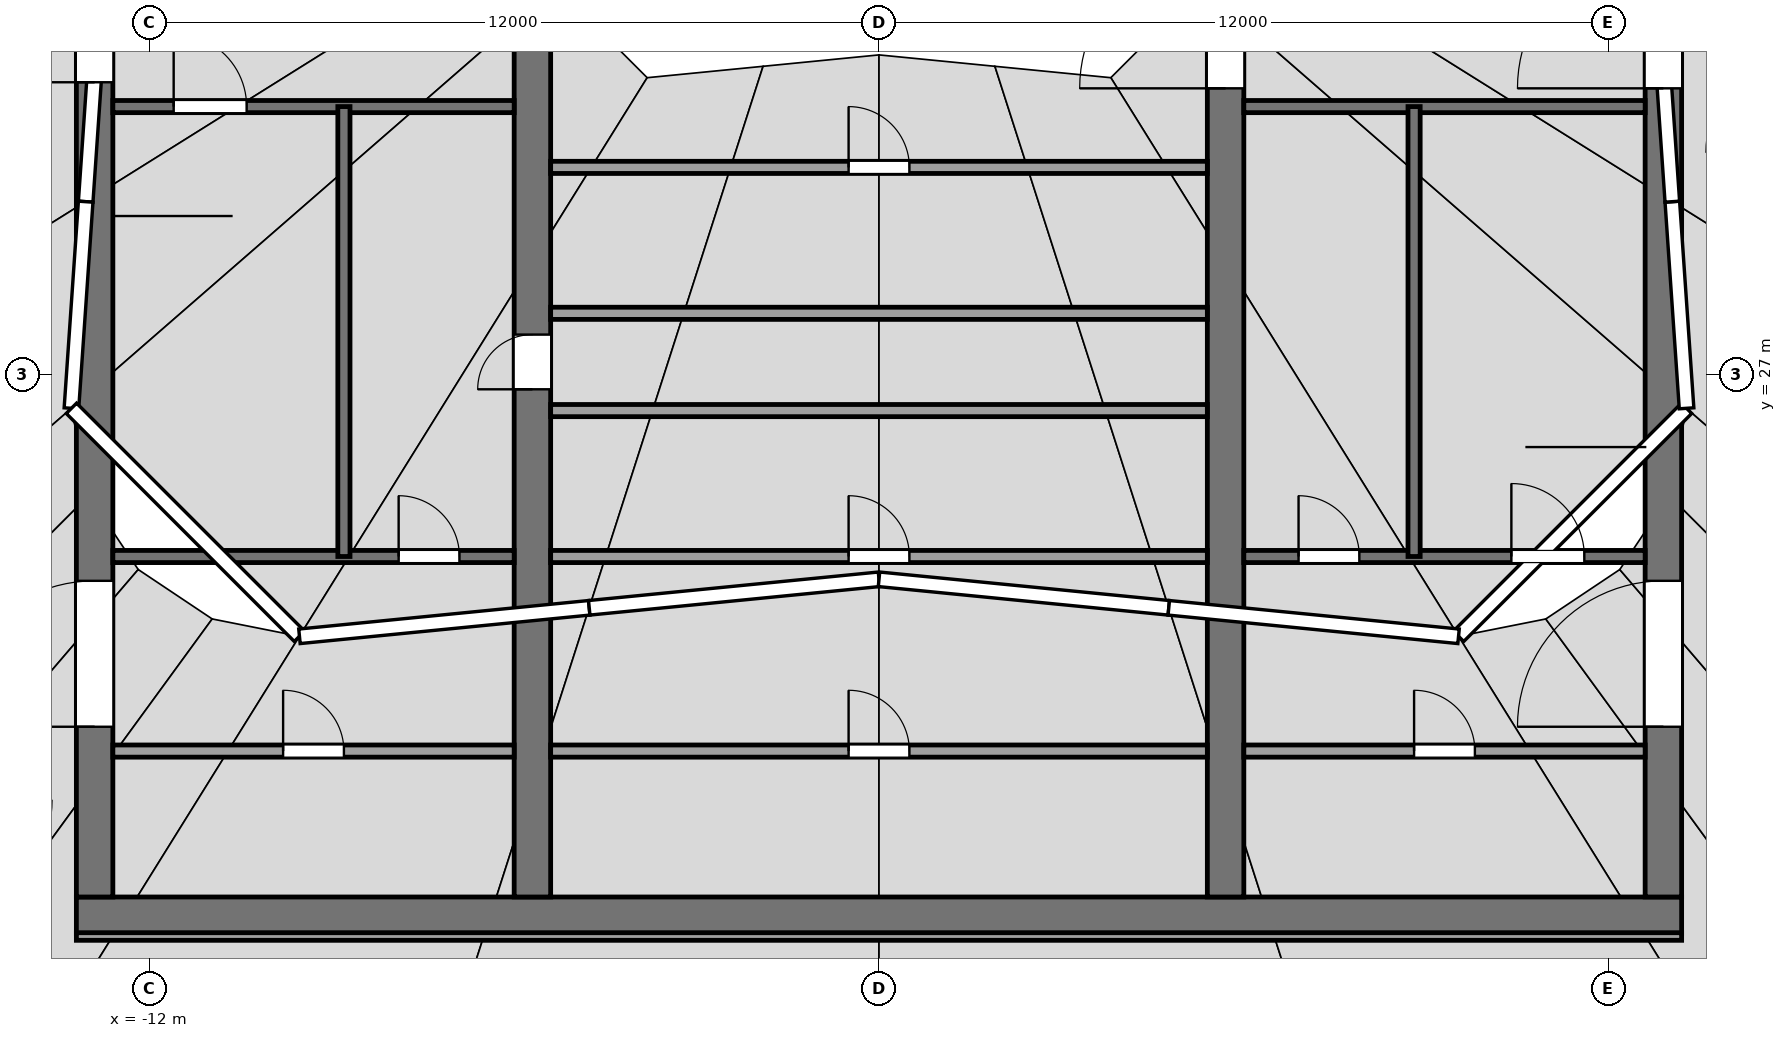
"""IFC4 building model, lengths in metres.
Left out: names, types, materials, properties, quantities, classifications, styles, units other than length and angle.
Written with IfcOpenShell. Run it as: python <this file> out.ifc"""

import sys

from ifc_helpers import new_model, si_unit, direction, frame, frame_2d, origin, place, context, subcontext, project, spatial, rectangle, extrude, element, fill, save


model = new_model("IFC4")
c1 = context("Model", 3, precision=1e-05, world=origin(), true_north=direction((0.0, 1.0)))
c2 = subcontext(c1, "Body", "Model", "MODEL_VIEW")
j1 = project(units=[si_unit("LENGTHUNIT", "METRE"), si_unit("PLANEANGLEUNIT", "RADIAN")], contexts=[c1])
p1 = place(None, origin())
s1 = spatial("IfcSite", under=j1, at=p1, CompositionType="ELEMENT")
p2 = place(p1, origin())
s2 = spatial("IfcBuilding", under=s1, at=p2, CompositionType="ELEMENT")
p3 = place(p2, frame((0.0, 0.0, 368.0)))
s3 = spatial("IfcBuildingStorey", under=s2, at=p3, CompositionType="ELEMENT", Elevation=368.0)
p4 = place(p3, frame((-13.2, 18.1, -0.15), z_axis=(0.0, 0.0, 1.0), x_axis=(1.0, 0.0, 0.0)))
e1 = element("IfcWall", 1, at=p4, inside=s3, PredefinedType="SHEAR", context=c2, shape_type="SweptSolid", body=[
    extrude(rectangle(XDim=26.4, YDim=0.6, at=frame_2d((13.2, 0.0))), origin(), (0.0, 0.0, 1.0), 3.45),
])
p5 = place(p3, frame((-12.9, 18.4, -0.15), z_axis=(0.0, 0.0, 1.0), x_axis=(0.0, 1.0, 0.0)))
e2 = element("IfcWall", 2, at=p5, inside=s3, PredefinedType="SHEAR", context=c2, shape_type="SweptSolid", body=[
    extrude(rectangle(XDim=19.2, YDim=0.6, at=frame_2d((9.6, 0.0))), origin(), (0.0, 0.0, 1.0), 3.45),
])
p6 = place(p5, frame((2.8, 0.0, 0.15)))
e3 = element("IfcOpeningElement", 3, at=p6, cuts=e2, PredefinedType="OPENING", context=c2, shape_type="SweptSolid", body=[
    extrude(rectangle(XDim=2.4, YDim=2.4, at=frame_2d((1.2, 1.2))), frame((0.0, 0.31, 0.0), z_axis=(0.0, -1.0, 0.0), x_axis=(1.0, 0.0, 0.0)), (0.0, 0.0, 1.0), 0.62),
])
p7 = place(p5, frame((13.4, 0.0, 0.15)))
e4 = element("IfcOpeningElement", 4, at=p7, cuts=e2, PredefinedType="OPENING", context=c2, shape_type="SweptSolid", body=[
    extrude(rectangle(XDim=1.4, YDim=2.2, at=frame_2d((0.7, 1.1))), frame((0.0, 0.31, 0.0), z_axis=(0.0, -1.0, 0.0), x_axis=(1.0, 0.0, 0.0)), (0.0, 0.0, 1.0), 0.62),
])
p8 = place(p3, frame((12.9, 18.4, -0.15), z_axis=(0.0, 0.0, 1.0), x_axis=(0.0, 1.0, 0.0)))
e5 = element("IfcWall", 5, at=p8, inside=s3, PredefinedType="SHEAR", context=c2, shape_type="SweptSolid", body=[
    extrude(rectangle(XDim=19.2, YDim=0.6, at=frame_2d((9.6, 0.0))), origin(), (0.0, 0.0, 1.0), 3.45),
])
p9 = place(p8, frame((2.8, 0.0, 0.15)))
e6 = element("IfcOpeningElement", 6, at=p9, cuts=e5, PredefinedType="OPENING", context=c2, shape_type="SweptSolid", body=[
    extrude(rectangle(XDim=2.4, YDim=2.4, at=frame_2d((1.2, 1.2))), frame((0.0, 0.31, 0.0), z_axis=(0.0, -1.0, 0.0), x_axis=(1.0, 0.0, 0.0)), (0.0, 0.0, 1.0), 0.62),
])
p10 = place(p8, frame((13.3, 0.0, 0.15)))
e7 = element("IfcOpeningElement", 7, at=p10, cuts=e5, PredefinedType="OPENING", context=c2, shape_type="SweptSolid", body=[
    extrude(rectangle(XDim=2.4, YDim=2.4, at=frame_2d((1.2, 1.2))), frame((0.0, 0.31, 0.0), z_axis=(0.0, -1.0, 0.0), x_axis=(1.0, 0.0, 0.0)), (0.0, 0.0, 1.0), 0.62),
])
p11 = place(p3, frame((-5.7, 18.4, -0.15), z_axis=(0.0, 0.0, 1.0), x_axis=(0.0, 1.0, 0.0)))
e8 = element("IfcWall", 8, at=p11, inside=s3, PredefinedType="SHEAR", context=c2, shape_type="SweptSolid", body=[
    extrude(rectangle(XDim=19.2, YDim=0.6, at=frame_2d((9.6, 0.0))), origin(), (0.0, 0.0, 1.0), 3.45),
])
p12 = place(p11, frame((8.35, 0.0, 0.15)))
e9 = element("IfcOpeningElement", 9, at=p12, cuts=e8, PredefinedType="OPENING", context=c2, shape_type="SweptSolid", body=[
    extrude(rectangle(XDim=0.9, YDim=2.1, at=frame_2d((0.45, 1.05))), frame((0.0, 0.31, 0.0), z_axis=(0.0, -1.0, 0.0), x_axis=(1.0, 0.0, 0.0)), (0.0, 0.0, 1.0), 0.62),
])
p13 = place(p3, frame((5.7, 18.4, -0.15), z_axis=(0.0, 0.0, 1.0), x_axis=(0.0, 1.0, 0.0)))
e10 = element("IfcWall", 10, at=p13, inside=s3, PredefinedType="SHEAR", context=c2, shape_type="SweptSolid", body=[
    extrude(rectangle(XDim=19.2, YDim=0.6, at=frame_2d((9.6, 0.0))), origin(), (0.0, 0.0, 1.0), 3.45),
])
p14 = place(p13, frame((13.3, 0.0, 0.15)))
e11 = element("IfcOpeningElement", 11, at=p14, cuts=e10, PredefinedType="OPENING", context=c2, shape_type="SweptSolid", body=[
    extrude(rectangle(XDim=2.4, YDim=2.4, at=frame_2d((1.2, 1.2))), frame((0.0, 0.31, 0.0), z_axis=(0.0, -1.0, 0.0), x_axis=(1.0, 0.0, 0.0)), (0.0, 0.0, 1.0), 0.62),
])
p15 = place(p3, frame((-12.6, 20.8, 0.0), z_axis=(0.0, 0.0, 1.0), x_axis=(1.0, 0.0, 0.0)))
e12 = element("IfcWall", 12, at=p15, inside=s3, PredefinedType="PARTITIONING", context=c2, shape_type="SweptSolid", body=[
    extrude(rectangle(XDim=6.6, YDim=0.2, at=frame_2d((3.3, 0.0))), origin(), (0.0, 0.0, 1.0), 3.3),
])
p16 = place(p15, frame((2.8, 0.0, 0.0)))
e13 = element("IfcOpeningElement", 13, at=p16, cuts=e12, PredefinedType="OPENING", context=c2, shape_type="SweptSolid", body=[
    extrude(rectangle(XDim=1.0, YDim=2.1, at=frame_2d((0.5, 1.05))), frame((0.0, 0.11, 0.0), z_axis=(0.0, -1.0, 0.0), x_axis=(1.0, 0.0, 0.0)), (0.0, 0.0, 1.0), 0.22),
])
p17 = place(p3, frame((-5.4, 20.8, 0.0), z_axis=(0.0, 0.0, 1.0), x_axis=(1.0, 0.0, 0.0)))
e14 = element("IfcWall", 14, at=p17, inside=s3, PredefinedType="PARTITIONING", context=c2, shape_type="SweptSolid", body=[
    extrude(rectangle(XDim=10.8, YDim=0.2, at=frame_2d((5.4, 0.0))), origin(), (0.0, 0.0, 1.0), 3.3),
])
p18 = place(p17, frame((4.9, 0.0, 0.0)))
e15 = element("IfcOpeningElement", 15, at=p18, cuts=e14, PredefinedType="OPENING", context=c2, shape_type="SweptSolid", body=[
    extrude(rectangle(XDim=1.0, YDim=2.1, at=frame_2d((0.5, 1.05))), frame((0.0, 0.11, 0.0), z_axis=(0.0, -1.0, 0.0), x_axis=(1.0, 0.0, 0.0)), (0.0, 0.0, 1.0), 0.22),
])
p19 = place(p3, frame((6.0, 20.8, 0.0), z_axis=(0.0, 0.0, 1.0), x_axis=(1.0, 0.0, 0.0)))
e16 = element("IfcWall", 16, at=p19, inside=s3, PredefinedType="PARTITIONING", context=c2, shape_type="SweptSolid", body=[
    extrude(rectangle(XDim=6.6, YDim=0.2, at=frame_2d((3.3, 0.0))), origin(), (0.0, 0.0, 1.0), 3.3),
])
p20 = place(p19, frame((2.8, 0.0, 0.0)))
e17 = element("IfcOpeningElement", 17, at=p20, cuts=e16, PredefinedType="OPENING", context=c2, shape_type="SweptSolid", body=[
    extrude(rectangle(XDim=1.0, YDim=2.1, at=frame_2d((0.5, 1.05))), frame((0.0, 0.11, 0.0), z_axis=(0.0, -1.0, 0.0), x_axis=(1.0, 0.0, 0.0)), (0.0, 0.0, 1.0), 0.22),
])
p21 = place(p3, frame((-12.6, 24.0, 0.0), z_axis=(0.0, 0.0, 1.0), x_axis=(1.0, 0.0, 0.0)))
e18 = element("IfcWall", 18, at=p21, inside=s3, PredefinedType="PARTITIONING", context=c2, shape_type="SweptSolid", body=[
    extrude(rectangle(XDim=6.6, YDim=0.2, at=frame_2d((3.3, 0.0))), origin(), (0.0, 0.0, 1.0), 3.3),
])
p22 = place(p21, frame((4.7, 0.0, 0.0)))
e19 = element("IfcOpeningElement", 19, at=p22, cuts=e18, PredefinedType="OPENING", context=c2, shape_type="SweptSolid", body=[
    extrude(rectangle(XDim=1.0, YDim=2.1, at=frame_2d((0.5, 1.05))), frame((0.0, 0.11, 0.0), z_axis=(0.0, -1.0, 0.0), x_axis=(1.0, 0.0, 0.0)), (0.0, 0.0, 1.0), 0.22),
])
p23 = place(p3, frame((-5.4, 24.0, 0.0), z_axis=(0.0, 0.0, 1.0), x_axis=(1.0, 0.0, 0.0)))
e20 = element("IfcWall", 20, at=p23, inside=s3, PredefinedType="PARTITIONING", context=c2, shape_type="SweptSolid", body=[
    extrude(rectangle(XDim=10.8, YDim=0.2, at=frame_2d((5.4, 0.0))), origin(), (0.0, 0.0, 1.0), 3.3),
])
p24 = place(p23, frame((4.9, 0.0, 0.0)))
e21 = element("IfcOpeningElement", 21, at=p24, cuts=e20, PredefinedType="OPENING", context=c2, shape_type="SweptSolid", body=[
    extrude(rectangle(XDim=1.0, YDim=2.1, at=frame_2d((0.5, 1.05))), frame((0.0, 0.11, 0.0), z_axis=(0.0, -1.0, 0.0), x_axis=(1.0, 0.0, 0.0)), (0.0, 0.0, 1.0), 0.22),
])
p25 = place(p3, frame((6.0, 24.0, 0.0), z_axis=(0.0, 0.0, 1.0), x_axis=(1.0, 0.0, 0.0)))
e22 = element("IfcWall", 22, at=p25, inside=s3, PredefinedType="PARTITIONING", context=c2, shape_type="SweptSolid", body=[
    extrude(rectangle(XDim=6.6, YDim=0.2, at=frame_2d((3.3, 0.0))), origin(), (0.0, 0.0, 1.0), 3.3),
])
p26 = place(p25, frame((0.9, 0.0, 0.0)))
e23 = element("IfcOpeningElement", 23, at=p26, cuts=e22, PredefinedType="OPENING", context=c2, shape_type="SweptSolid", body=[
    extrude(rectangle(XDim=1.0, YDim=2.1, at=frame_2d((0.5, 1.05))), frame((0.0, 0.11, 0.0), z_axis=(0.0, -1.0, 0.0), x_axis=(1.0, 0.0, 0.0)), (0.0, 0.0, 1.0), 0.22),
])
p27 = place(p25, frame((4.4, 0.0, 0.0)))
e24 = element("IfcOpeningElement", 24, at=p27, cuts=e22, PredefinedType="OPENING", context=c2, shape_type="SweptSolid", body=[
    extrude(rectangle(XDim=1.2, YDim=2.2, at=frame_2d((0.6, 1.1))), frame((0.0, 0.11, 0.0), z_axis=(0.0, -1.0, 0.0), x_axis=(1.0, 0.0, 0.0)), (0.0, 0.0, 1.0), 0.22),
])
for number, where, z_axis, x_axis in (
    (25, (-5.4, 26.4, 0.0), (0.0, 0.0, 1.0), (1.0, 0.0, 0.0)),
    (26, (-5.4, 28.0, 0.0), (0.0, 0.0, 1.0), (1.0, 0.0, 0.0)),
):
    element("IfcWall", number, at=place(p3, frame(where, z_axis=z_axis, x_axis=x_axis)), inside=s3, PredefinedType="PARTITIONING", context=c2, shape_type="SweptSolid", body=[
        extrude(rectangle(XDim=10.8, YDim=0.2, at=frame_2d((5.4, 0.0))), origin(), (0.0, 0.0, 1.0), 3.3),
    ])
p28 = place(p3, frame((-5.4, 30.4, 0.0), z_axis=(0.0, 0.0, 1.0), x_axis=(1.0, 0.0, 0.0)))
e27 = element("IfcWall", 27, at=p28, inside=s3, PredefinedType="PARTITIONING", context=c2, shape_type="SweptSolid", body=[
    extrude(rectangle(XDim=10.8, YDim=0.2, at=frame_2d((5.4, 0.0))), origin(), (0.0, 0.0, 1.0), 3.3),
])
p29 = place(p28, frame((4.9, 0.0, 0.0)))
e28 = element("IfcOpeningElement", 28, at=p29, cuts=e27, PredefinedType="OPENING", context=c2, shape_type="SweptSolid", body=[
    extrude(rectangle(XDim=1.0, YDim=2.1, at=frame_2d((0.5, 1.05))), frame((0.0, 0.11, 0.0), z_axis=(0.0, -1.0, 0.0), x_axis=(1.0, 0.0, 0.0)), (0.0, 0.0, 1.0), 0.22),
])
p30 = place(p3, frame((-12.6, 31.4, 0.0), z_axis=(0.0, 0.0, 1.0), x_axis=(1.0, 0.0, 0.0)))
e29 = element("IfcWall", 29, at=p30, inside=s3, PredefinedType="PARTITIONING", context=c2, shape_type="SweptSolid", body=[
    extrude(rectangle(XDim=6.6, YDim=0.2, at=frame_2d((3.3, 0.0))), origin(), (0.0, 0.0, 1.0), 3.3),
])
p31 = place(p30, frame((1.0, 0.0, 0.0)))
e30 = element("IfcOpeningElement", 30, at=p31, cuts=e29, PredefinedType="OPENING", context=c2, shape_type="SweptSolid", body=[
    extrude(rectangle(XDim=1.2, YDim=2.2, at=frame_2d((0.6, 1.1))), frame((0.0, 0.11, 0.0), z_axis=(0.0, -1.0, 0.0), x_axis=(1.0, 0.0, 0.0)), (0.0, 0.0, 1.0), 0.22),
])
p32 = place(p3, frame((6.0, 31.4, 0.0), z_axis=(0.0, 0.0, 1.0), x_axis=(1.0, 0.0, 0.0)))
e31 = element("IfcWall", 31, at=p32, inside=s3, PredefinedType="PARTITIONING", context=c2, shape_type="SweptSolid", body=[
    extrude(rectangle(XDim=6.6, YDim=0.2, at=frame_2d((3.3, 0.0))), origin(), (0.0, 0.0, 1.0), 3.3),
])
for number, where, z_axis, x_axis in (
    (32, (-8.8, 24.0, 0.0), (0.0, 0.0, 1.0), (0.0, 1.0, 0.0)),
    (33, (8.8, 24.0, 0.0), (0.0, 0.0, 1.0), (0.0, 1.0, 0.0)),
):
    element("IfcWall", number, at=place(p3, frame(where, z_axis=z_axis, x_axis=x_axis)), inside=s3, PredefinedType="PARTITIONING", context=c2, shape_type="SweptSolid", body=[
        extrude(rectangle(XDim=7.4, YDim=0.2, at=frame_2d((3.7, 0.0))), origin(), (0.0, 0.0, 1.0), 3.3),
    ])
p33 = place(p3, frame((-13.2, 17.75, 0.0), z_axis=(0.0, 0.0, 1.0), x_axis=(1.0, 0.0, 0.0)))
e34 = element("IfcWall", 34, at=p33, inside=s3, PredefinedType="PARTITIONING", context=c2, shape_type="SweptSolid", body=[
    extrude(rectangle(XDim=26.4, YDim=0.125, at=frame_2d((13.2, 0.0))), origin(), (0.0, 0.0, 1.0), 2.97),
])
p34 = place(p18, origin())
e35 = element("IfcDoor", 35, at=p34, inside=s3, OperationType="SINGLE_SWING_LEFT", PredefinedType="DOOR", context=c2, shape_type="SweptSolid", body=[
    extrude(rectangle(XDim=1.0, YDim=2.1, at=frame_2d((0.5, 1.05))), frame((0.0, 0.025, 0.0), z_axis=(0.0, -1.0, 0.0), x_axis=(1.0, 0.0, 0.0)), (0.0, 0.0, 1.0), 0.05),
])
fill(e15, e35)
p35 = place(p24, origin())
e36 = element("IfcDoor", 36, at=p35, inside=s3, OperationType="SINGLE_SWING_RIGHT", PredefinedType="DOOR", context=c2, shape_type="SweptSolid", body=[
    extrude(rectangle(XDim=1.0, YDim=2.1, at=frame_2d((0.5, 1.05))), frame((0.0, 0.025, 0.0), z_axis=(0.0, -1.0, 0.0), x_axis=(1.0, 0.0, 0.0)), (0.0, 0.0, 1.0), 0.05),
])
fill(e21, e36)
p36 = place(p29, origin())
e37 = element("IfcDoor", 37, at=p36, inside=s3, OperationType="SINGLE_SWING_LEFT", PredefinedType="DOOR", context=c2, shape_type="SweptSolid", body=[
    extrude(rectangle(XDim=1.0, YDim=2.1, at=frame_2d((0.5, 1.05))), frame((0.0, 0.025, 0.0), z_axis=(0.0, -1.0, 0.0), x_axis=(1.0, 0.0, 0.0)), (0.0, 0.0, 1.0), 0.05),
])
fill(e28, e37)
p37 = place(p16, origin())
e38 = element("IfcDoor", 38, at=p37, inside=s3, OperationType="SINGLE_SWING_RIGHT", PredefinedType="DOOR", context=c2, shape_type="SweptSolid", body=[
    extrude(rectangle(XDim=1.0, YDim=2.1, at=frame_2d((0.5, 1.05))), frame((0.0, 0.025, 0.0), z_axis=(0.0, -1.0, 0.0), x_axis=(1.0, 0.0, 0.0)), (0.0, 0.0, 1.0), 0.05),
])
fill(e13, e38)
p38 = place(p20, origin())
e39 = element("IfcDoor", 39, at=p38, inside=s3, OperationType="SINGLE_SWING_LEFT", PredefinedType="DOOR", context=c2, shape_type="SweptSolid", body=[
    extrude(rectangle(XDim=1.0, YDim=2.1, at=frame_2d((0.5, 1.05))), frame((0.0, 0.025, 0.0), z_axis=(0.0, -1.0, 0.0), x_axis=(1.0, 0.0, 0.0)), (0.0, 0.0, 1.0), 0.05),
])
fill(e17, e39)
p39 = place(p22, origin())
e40 = element("IfcDoor", 40, at=p39, inside=s3, OperationType="SINGLE_SWING_LEFT", PredefinedType="DOOR", context=c2, shape_type="SweptSolid", body=[
    extrude(rectangle(XDim=1.0, YDim=2.1, at=frame_2d((0.5, 1.05))), frame((0.0, 0.025, 0.0), z_axis=(0.0, -1.0, 0.0), x_axis=(1.0, 0.0, 0.0)), (0.0, 0.0, 1.0), 0.05),
])
fill(e19, e40)
p40 = place(p26, origin())
e41 = element("IfcDoor", 41, at=p40, inside=s3, OperationType="SINGLE_SWING_RIGHT", PredefinedType="DOOR", context=c2, shape_type="SweptSolid", body=[
    extrude(rectangle(XDim=1.0, YDim=2.1, at=frame_2d((0.5, 1.05))), frame((0.0, 0.025, 0.0), z_axis=(0.0, -1.0, 0.0), x_axis=(1.0, 0.0, 0.0)), (0.0, 0.0, 1.0), 0.05),
])
fill(e23, e41)
p41 = place(p12, origin())
e42 = element("IfcDoor", 42, at=p41, inside=s3, OperationType="SINGLE_SWING_LEFT", PredefinedType="DOOR", context=c2, shape_type="SweptSolid", body=[
    extrude(rectangle(XDim=0.9, YDim=2.1, at=frame_2d((0.45, 1.05))), frame((0.0, 0.025, 0.0), z_axis=(0.0, -1.0, 0.0), x_axis=(1.0, 0.0, 0.0)), (0.0, 0.0, 1.0), 0.05),
])
fill(e9, e42)
p42 = place(p31, origin())
e43 = element("IfcDoor", 43, at=p42, inside=s3, OperationType="SINGLE_SWING_LEFT", PredefinedType="DOOR", context=c2, shape_type="SweptSolid", body=[
    extrude(rectangle(XDim=1.2, YDim=2.2, at=frame_2d((0.6, 1.1))), frame((0.0, 0.025, 0.0), z_axis=(0.0, -1.0, 0.0), x_axis=(1.0, 0.0, 0.0)), (0.0, 0.0, 1.0), 0.05),
])
fill(e30, e43)
p43 = place(p27, origin())
e44 = element("IfcDoor", 44, at=p43, inside=s3, OperationType="SINGLE_SWING_RIGHT", PredefinedType="DOOR", context=c2, shape_type="SweptSolid", body=[
    extrude(rectangle(XDim=1.2, YDim=2.2, at=frame_2d((0.6, 1.1))), frame((0.0, 0.025, 0.0), z_axis=(0.0, -1.0, 0.0), x_axis=(1.0, 0.0, 0.0)), (0.0, 0.0, 1.0), 0.05),
])
fill(e24, e44)
p44 = place(p14, origin())
e45 = element("IfcDoor", 45, at=p44, inside=s3, OperationType="DOUBLE_DOOR_SINGLE_SWING", PredefinedType="DOOR", context=c2, shape_type="SweptSolid", body=[
    extrude(rectangle(XDim=2.4, YDim=2.4, at=frame_2d((1.2, 1.2))), frame((0.0, 0.025, 0.0), z_axis=(0.0, -1.0, 0.0), x_axis=(1.0, 0.0, 0.0)), (0.0, 0.0, 1.0), 0.05),
])
fill(e11, e45)
p45 = place(p6, origin())
e46 = element("IfcDoor", 46, at=p45, inside=s3, OperationType="DOUBLE_DOOR_SINGLE_SWING", PredefinedType="DOOR", context=c2, shape_type="SweptSolid", body=[
    extrude(rectangle(XDim=2.4, YDim=2.4, at=frame_2d((1.2, 1.2))), frame((0.0, 0.025, 0.0), z_axis=(0.0, -1.0, 0.0), x_axis=(1.0, 0.0, 0.0)), (0.0, 0.0, 1.0), 0.05),
])
fill(e3, e46)
p46 = place(p9, origin())
e47 = element("IfcDoor", 47, at=p46, inside=s3, OperationType="DOUBLE_DOOR_SINGLE_SWING", PredefinedType="DOOR", context=c2, shape_type="SweptSolid", body=[
    extrude(rectangle(XDim=2.4, YDim=2.4, at=frame_2d((1.2, 1.2))), frame((0.0, 0.025, 0.0), z_axis=(0.0, -1.0, 0.0), x_axis=(1.0, 0.0, 0.0)), (0.0, 0.0, 1.0), 0.05),
])
fill(e6, e47)
p47 = place(p10, origin())
e48 = element("IfcDoor", 48, at=p47, inside=s3, OperationType="DOUBLE_DOOR_SINGLE_SWING", PredefinedType="DOOR", context=c2, shape_type="SweptSolid", body=[
    extrude(rectangle(XDim=2.4, YDim=2.4, at=frame_2d((1.2, 1.2))), frame((0.0, 0.025, 0.0), z_axis=(0.0, -1.0, 0.0), x_axis=(1.0, 0.0, 0.0)), (0.0, 0.0, 1.0), 0.05),
])
fill(e7, e48)
p48 = place(p7, origin())
e49 = element("IfcDoor", 49, at=p48, inside=s3, OperationType="SINGLE_SWING_LEFT", PredefinedType="DOOR", context=c2, shape_type="SweptSolid", body=[
    extrude(rectangle(XDim=1.4, YDim=2.2, at=frame_2d((0.7, 1.1))), frame((0.0, 0.025, 0.0), z_axis=(0.0, -1.0, 0.0), x_axis=(1.0, 0.0, 0.0)), (0.0, 0.0, 1.0), 0.05),
])
fill(e4, e49)
save(model, sys.argv[1])
